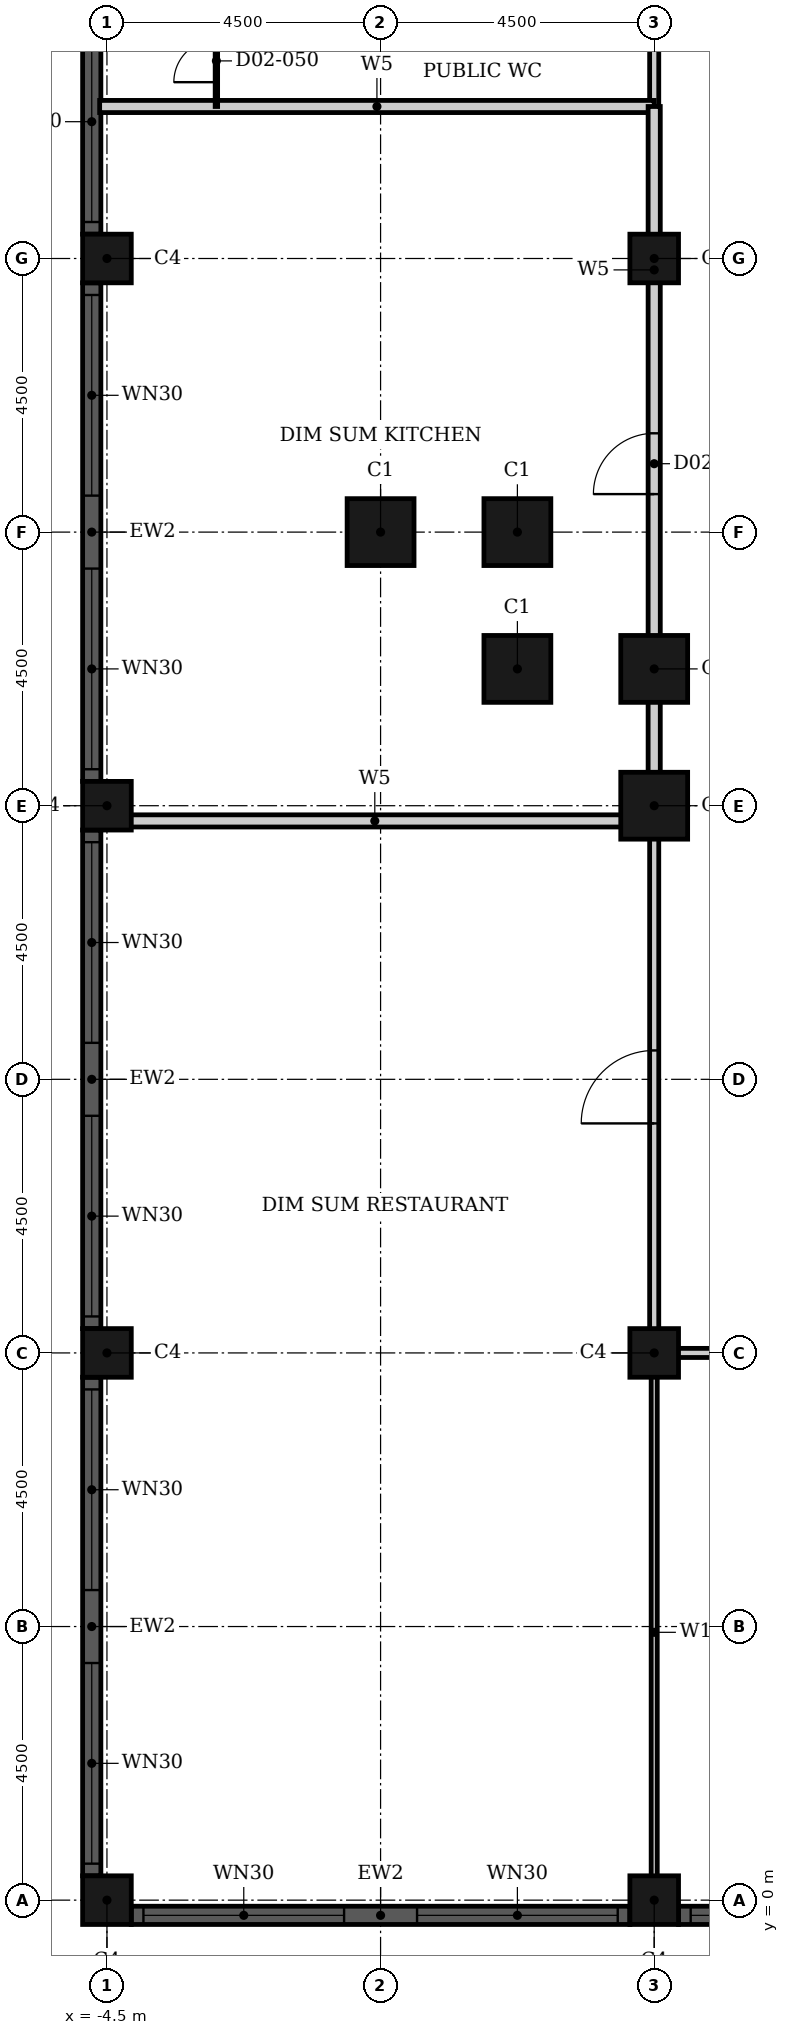
"""IFC4 building model, lengths in metres.
Left out: names, types, materials, properties, quantities, classifications, styles, units other than length and angle.
Written with IfcOpenShell. Run it as: python <this file> out.ifc"""

import sys

from ifc_helpers import new_model, si_unit, direction, frame, frame_2d, origin, origin_2d, place, context, subcontext, project, spatial, rectangle, hollow_rectangle, extrude, element, fill, save


model = new_model("IFC4")
c1 = context("Model", 3, precision=1e-05, world=origin(), true_north=direction((0.0, 1.0)))
c2 = subcontext(c1, "Body", "Model", "MODEL_VIEW")
j1 = project(units=[si_unit("LENGTHUNIT", "METRE"), si_unit("PLANEANGLEUNIT", "RADIAN")], contexts=[c1])
p1 = place(None, origin())
s1 = spatial("IfcSite", under=j1, at=p1, CompositionType="ELEMENT")
p2 = place(p1, origin())
s2 = spatial("IfcBuilding", under=s1, at=p2, CompositionType="ELEMENT")
p3 = place(p2, frame((0.0, 0.0, 12.0)))
s3 = spatial("IfcBuildingStorey", under=s2, at=p3, CompositionType="ELEMENT", Elevation=12.0)
for number, where, z_axis, x_axis in (
    (1, (0.0, 22.5, 0.0), (0.0, 0.0, 1.0), (1.0, 0.0, 0.0)),
    (2, (2.25, 22.5, 0.0), (0.0, 0.0, 1.0), (1.0, 0.0, 0.0)),
    (3, (2.25, 20.25, 0.0), (0.0, 0.0, 1.0), (1.0, 0.0, 0.0)),
    (4, (4.5, 20.25, 0.0), (0.0, 0.0, 1.0), (1.0, 0.0, 0.0)),
    (5, (4.5, 18.0, 0.0), (0.0, 0.0, 1.0), (1.0, 0.0, 0.0)),
):
    element("IfcColumn", number, at=place(p3, frame(where, z_axis=z_axis, x_axis=x_axis)), inside=s3, PredefinedType="COLUMN", context=c2, shape_type="SweptSolid", body=[
        extrude(hollow_rectangle(XDim=1.1, YDim=1.1, WallThickness=0.036, at=origin_2d()), origin(), (0.0, 0.0, 1.0), 5.4),
    ])
for number, where, z_axis, x_axis in (
    (6, (-4.5, 0.0, 0.0), (0.0, 0.0, 1.0), (1.0, 0.0, 0.0)),
    (7, (-4.5, 9.0, 0.0), (0.0, 0.0, 1.0), (1.0, 0.0, 0.0)),
    (8, (-4.5, 18.0, 0.0), (0.0, 0.0, 1.0), (1.0, 0.0, 0.0)),
    (9, (-4.5, 27.0, 0.0), (0.0, 0.0, 1.0), (1.0, 0.0, 0.0)),
    (10, (4.5, 0.0, 0.0), (0.0, 0.0, 1.0), (1.0, 0.0, 0.0)),
    (11, (4.5, 9.0, 0.0), (0.0, 0.0, 1.0), (1.0, 0.0, 0.0)),
    (12, (4.5, 27.0, 0.0), (0.0, 0.0, 1.0), (1.0, 0.0, 0.0)),
):
    element("IfcColumn", number, at=place(p3, frame(where, z_axis=z_axis, x_axis=x_axis)), inside=s3, PredefinedType="COLUMN", context=c2, shape_type="SweptSolid", body=[
        extrude(hollow_rectangle(XDim=0.8, YDim=0.8, WallThickness=0.025, at=origin_2d()), origin(), (0.0, 0.0, 1.0), 5.4),
    ])
p4 = place(p3, frame((-4.75, 35.6, 0.0), z_axis=(0.0, 0.0, 1.0), x_axis=(0.0, -1.0, 0.0)))
e13 = element("IfcWall", 13, at=p4, inside=s3, PredefinedType="SOLIDWALL", context=c2, shape_type="SweptSolid", body=[
    extrude(rectangle(XDim=8.2, YDim=0.3, at=frame_2d((4.1, 0.0))), origin(), (0.0, 0.0, 1.0), 5.4),
])
p5 = place(p4, frame((0.2, 0.0, 0.9)))
e14 = element("IfcOpeningElement", 14, at=p5, cuts=e13, PredefinedType="OPENING", context=c2, shape_type="SweptSolid", body=[
    extrude(rectangle(XDim=3.3, YDim=3.5, at=frame_2d((1.65, 1.75))), frame((0.0, 0.16, 0.0), z_axis=(0.0, -1.0, 0.0), x_axis=(1.0, 0.0, 0.0)), (0.0, 0.0, 1.0), 0.32),
])
p6 = place(p4, frame((4.7, 0.0, 0.9)))
e15 = element("IfcOpeningElement", 15, at=p6, cuts=e13, PredefinedType="OPENING", context=c2, shape_type="SweptSolid", body=[
    extrude(rectangle(XDim=3.3, YDim=3.5, at=frame_2d((1.65, 1.75))), frame((0.0, 0.16, 0.0), z_axis=(0.0, -1.0, 0.0), x_axis=(1.0, 0.0, 0.0)), (0.0, 0.0, 1.0), 0.32),
])
p7 = place(p3, frame((-4.75, 26.6, 0.0), z_axis=(0.0, 0.0, 1.0), x_axis=(0.0, -1.0, 0.0)))
e16 = element("IfcWall", 16, at=p7, inside=s3, PredefinedType="SOLIDWALL", context=c2, shape_type="SweptSolid", body=[
    extrude(rectangle(XDim=8.2, YDim=0.3, at=frame_2d((4.1, 0.0))), origin(), (0.0, 0.0, 1.0), 5.4),
])
p8 = place(p7, frame((0.2, 0.0, 0.9)))
e17 = element("IfcOpeningElement", 17, at=p8, cuts=e16, PredefinedType="OPENING", context=c2, shape_type="SweptSolid", body=[
    extrude(rectangle(XDim=3.3, YDim=3.5, at=frame_2d((1.65, 1.75))), frame((0.0, 0.16, 0.0), z_axis=(0.0, -1.0, 0.0), x_axis=(1.0, 0.0, 0.0)), (0.0, 0.0, 1.0), 0.32),
])
p9 = place(p7, frame((4.7, 0.0, 0.9)))
e18 = element("IfcOpeningElement", 18, at=p9, cuts=e16, PredefinedType="OPENING", context=c2, shape_type="SweptSolid", body=[
    extrude(rectangle(XDim=3.3, YDim=3.5, at=frame_2d((1.65, 1.75))), frame((0.0, 0.16, 0.0), z_axis=(0.0, -1.0, 0.0), x_axis=(1.0, 0.0, 0.0)), (0.0, 0.0, 1.0), 0.32),
])
p10 = place(p3, frame((-4.75, 17.6, 0.0), z_axis=(0.0, 0.0, 1.0), x_axis=(0.0, -1.0, 0.0)))
e19 = element("IfcWall", 19, at=p10, inside=s3, PredefinedType="SOLIDWALL", context=c2, shape_type="SweptSolid", body=[
    extrude(rectangle(XDim=8.2, YDim=0.3, at=frame_2d((4.1, 0.0))), origin(), (0.0, 0.0, 1.0), 5.4),
])
p11 = place(p10, frame((0.2, 0.0, 0.9)))
e20 = element("IfcOpeningElement", 20, at=p11, cuts=e19, PredefinedType="OPENING", context=c2, shape_type="SweptSolid", body=[
    extrude(rectangle(XDim=3.3, YDim=3.5, at=frame_2d((1.65, 1.75))), frame((0.0, 0.16, 0.0), z_axis=(0.0, -1.0, 0.0), x_axis=(1.0, 0.0, 0.0)), (0.0, 0.0, 1.0), 0.32),
])
p12 = place(p10, frame((4.7, 0.0, 0.9)))
e21 = element("IfcOpeningElement", 21, at=p12, cuts=e19, PredefinedType="OPENING", context=c2, shape_type="SweptSolid", body=[
    extrude(rectangle(XDim=3.3, YDim=3.5, at=frame_2d((1.65, 1.75))), frame((0.0, 0.16, 0.0), z_axis=(0.0, -1.0, 0.0), x_axis=(1.0, 0.0, 0.0)), (0.0, 0.0, 1.0), 0.32),
])
p13 = place(p3, frame((-4.75, 8.6, 0.0), z_axis=(0.0, 0.0, 1.0), x_axis=(0.0, -1.0, 0.0)))
e22 = element("IfcWall", 22, at=p13, inside=s3, PredefinedType="SOLIDWALL", context=c2, shape_type="SweptSolid", body=[
    extrude(rectangle(XDim=8.2, YDim=0.3, at=frame_2d((4.1, 0.0))), origin(), (0.0, 0.0, 1.0), 5.4),
])
p14 = place(p13, frame((0.2, 0.0, 0.9)))
e23 = element("IfcOpeningElement", 23, at=p14, cuts=e22, PredefinedType="OPENING", context=c2, shape_type="SweptSolid", body=[
    extrude(rectangle(XDim=3.3, YDim=3.5, at=frame_2d((1.65, 1.75))), frame((0.0, 0.16, 0.0), z_axis=(0.0, -1.0, 0.0), x_axis=(1.0, 0.0, 0.0)), (0.0, 0.0, 1.0), 0.32),
])
p15 = place(p13, frame((4.7, 0.0, 0.9)))
e24 = element("IfcOpeningElement", 24, at=p15, cuts=e22, PredefinedType="OPENING", context=c2, shape_type="SweptSolid", body=[
    extrude(rectangle(XDim=3.3, YDim=3.5, at=frame_2d((1.65, 1.75))), frame((0.0, 0.16, 0.0), z_axis=(0.0, -1.0, 0.0), x_axis=(1.0, 0.0, 0.0)), (0.0, 0.0, 1.0), 0.32),
])
p16 = place(p3, frame((-4.1, -0.25, 0.0), z_axis=(0.0, 0.0, 1.0), x_axis=(1.0, 0.0, 0.0)))
e25 = element("IfcWall", 25, at=p16, inside=s3, PredefinedType="SOLIDWALL", context=c2, shape_type="SweptSolid", body=[
    extrude(rectangle(XDim=8.2, YDim=0.3, at=frame_2d((4.1, 0.0))), origin(), (0.0, 0.0, 1.0), 5.4),
])
p17 = place(p16, frame((0.2, 0.0, 0.9)))
e26 = element("IfcOpeningElement", 26, at=p17, cuts=e25, PredefinedType="OPENING", context=c2, shape_type="SweptSolid", body=[
    extrude(rectangle(XDim=3.3, YDim=3.5, at=frame_2d((1.65, 1.75))), frame((0.0, 0.16, 0.0), z_axis=(0.0, -1.0, 0.0), x_axis=(1.0, 0.0, 0.0)), (0.0, 0.0, 1.0), 0.32),
])
p18 = place(p16, frame((4.7, 0.0, 0.9)))
e27 = element("IfcOpeningElement", 27, at=p18, cuts=e25, PredefinedType="OPENING", context=c2, shape_type="SweptSolid", body=[
    extrude(rectangle(XDim=3.3, YDim=3.5, at=frame_2d((1.65, 1.75))), frame((0.0, 0.16, 0.0), z_axis=(0.0, -1.0, 0.0), x_axis=(1.0, 0.0, 0.0)), (0.0, 0.0, 1.0), 0.32),
])
p19 = place(p3, frame((4.9, -0.25, 0.0), z_axis=(0.0, 0.0, 1.0), x_axis=(1.0, 0.0, 0.0)))
e28 = element("IfcWall", 28, at=p19, inside=s3, PredefinedType="SOLIDWALL", context=c2, shape_type="SweptSolid", body=[
    extrude(rectangle(XDim=8.2, YDim=0.3, at=frame_2d((4.1, 0.0))), origin(), (0.0, 0.0, 1.0), 5.4),
])
p20 = place(p19, frame((0.2, 0.0, 0.9)))
e29 = element("IfcOpeningElement", 29, at=p20, cuts=e28, PredefinedType="OPENING", context=c2, shape_type="SweptSolid", body=[
    extrude(rectangle(XDim=3.3, YDim=3.5, at=frame_2d((1.65, 1.75))), frame((0.0, 0.16, 0.0), z_axis=(0.0, -1.0, 0.0), x_axis=(1.0, 0.0, 0.0)), (0.0, 0.0, 1.0), 0.32),
])
p21 = place(p19, frame((4.7, 0.0, 0.9)))
e30 = element("IfcOpeningElement", 30, at=p21, cuts=e28, PredefinedType="OPENING", context=c2, shape_type="SweptSolid", body=[
    extrude(rectangle(XDim=3.3, YDim=3.5, at=frame_2d((1.65, 1.75))), frame((0.0, 0.16, 0.0), z_axis=(0.0, -1.0, 0.0), x_axis=(1.0, 0.0, 0.0)), (0.0, 0.0, 1.0), 0.32),
])
p22 = place(p3, frame((4.5, 9.0, 0.0), z_axis=(0.0, 0.0, 1.0), x_axis=(1.0, 0.0, 0.0)))
e31 = element("IfcWall", 31, at=p22, inside=s3, PredefinedType="PARTITIONING", context=c2, shape_type="SweptSolid", body=[
    extrude(rectangle(XDim=3.1, YDim=0.15, at=frame_2d((1.55, 0.0))), origin(), (0.0, 0.0, 1.0), 5.05),
])
p23 = place(p3, frame((4.5, 9.0, 0.0), z_axis=(0.0, 0.0, 1.0), x_axis=(0.0, 1.0, 0.0)))
e32 = element("IfcWall", 32, at=p23, inside=s3, PredefinedType="PARTITIONING", context=c2, shape_type="SweptSolid", body=[
    extrude(rectangle(XDim=8.75, YDim=0.15, at=frame_2d((4.375, 0.0))), origin(), (0.0, 0.0, 1.0), 5.05),
])
p24 = place(p23, frame((3.775, 0.0, 0.0)))
e33 = element("IfcOpeningElement", 33, at=p24, cuts=e32, PredefinedType="OPENING", context=c2, shape_type="SweptSolid", body=[
    extrude(rectangle(XDim=1.2, YDim=2.4, at=frame_2d((0.6, 1.2))), frame((0.0, 0.085, 0.0), z_axis=(0.0, -1.0, 0.0), x_axis=(1.0, 0.0, 0.0)), (0.0, 0.0, 1.0), 0.17),
])
p25 = place(p3, frame((4.5, 29.5, 0.0), z_axis=(0.0, 0.0, 1.0), x_axis=(0.0, 1.0, 0.0)))
e34 = element("IfcWall", 34, at=p25, inside=s3, PredefinedType="PARTITIONING", context=c2, shape_type="SweptSolid", body=[
    extrude(rectangle(XDim=4.5, YDim=0.15, at=frame_2d((2.25, 0.0))), origin(), (0.0, 0.0, 1.0), 5.05),
])
p26 = place(p3, frame((4.5, -0.19, 0.0), z_axis=(0.0, 0.0, 1.0), x_axis=(0.0, 1.0, 0.0)))
e35 = element("IfcWall", 35, at=p26, inside=s3, PredefinedType="PARTITIONING", context=c2, shape_type="SweptSolid", body=[
    extrude(rectangle(XDim=9.19, YDim=0.1, at=frame_2d((4.595, 0.0))), origin(), (0.0, 0.0, 1.0), 5.05),
])
p27 = place(p3, frame((-4.69, 17.75, 0.0), z_axis=(0.0, 0.0, 1.0), x_axis=(1.0, 0.0, 0.0)))
e36 = element("IfcWall", 36, at=p27, inside=s3, PredefinedType="PARTITIONING", context=c2, shape_type="SweptSolid", body=[
    extrude(rectangle(XDim=9.19, YDim=0.2, at=frame_2d((4.595, 0.0))), origin(), (0.0, 0.0, 1.0), 5.05),
])
p28 = place(p3, frame((-4.62, 29.5, 0.0), z_axis=(0.0, 0.0, 1.0), x_axis=(1.0, 0.0, 0.0)))
e37 = element("IfcWall", 37, at=p28, inside=s3, PredefinedType="PARTITIONING", context=c2, shape_type="SweptSolid", body=[
    extrude(rectangle(XDim=9.12, YDim=0.2, at=frame_2d((4.56, 0.0))), origin(), (0.0, 0.0, 1.0), 5.05),
])
p29 = place(p3, frame((4.5, 17.75, 0.0), z_axis=(0.0, 0.0, 1.0), x_axis=(0.0, 1.0, 0.0)))
e38 = element("IfcWall", 38, at=p29, inside=s3, PredefinedType="PARTITIONING", context=c2, shape_type="SweptSolid", body=[
    extrude(rectangle(XDim=11.75, YDim=0.2, at=frame_2d((5.875, 0.0))), origin(), (0.0, 0.0, 1.0), 5.05),
])
p30 = place(p29, frame((5.375, 0.0, 0.0)))
e39 = element("IfcOpeningElement", 39, at=p30, cuts=e38, PredefinedType="OPENING", context=c2, shape_type="SweptSolid", body=[
    extrude(rectangle(XDim=1.0, YDim=2.1, at=frame_2d((0.5, 1.05))), frame((0.0, 0.11, 0.0), z_axis=(0.0, -1.0, 0.0), x_axis=(1.0, 0.0, 0.0)), (0.0, 0.0, 1.0), 0.22),
])
p31 = place(p3, frame((-2.7, 29.5, 0.0), z_axis=(0.0, 0.0, 1.0), x_axis=(0.0, 1.0, 0.0)))
e40 = element("IfcWall", 40, at=p31, inside=s3, PredefinedType="PARTITIONING", context=c2, shape_type="SweptSolid", body=[
    extrude(rectangle(XDim=4.5, YDim=0.04, at=frame_2d((2.25, 0.0))), origin(), (0.0, 0.0, 1.0), 5.05),
])
p32 = place(p31, frame((0.4, 0.0, 0.0)))
e41 = element("IfcOpeningElement", 41, at=p32, cuts=e40, PredefinedType="OPENING", context=c2, shape_type="SweptSolid", body=[
    extrude(rectangle(XDim=0.7, YDim=2.0, at=frame_2d((0.35, 1.0))), frame((0.0, 0.03, 0.0), z_axis=(0.0, -1.0, 0.0), x_axis=(1.0, 0.0, 0.0)), (0.0, 0.0, 1.0), 0.06),
])
p33 = place(p31, frame((1.9, 0.0, 0.0)))
e42 = element("IfcOpeningElement", 42, at=p33, cuts=e40, PredefinedType="OPENING", context=c2, shape_type="SweptSolid", body=[
    extrude(rectangle(XDim=0.7, YDim=2.0, at=frame_2d((0.35, 1.0))), frame((0.0, 0.03, 0.0), z_axis=(0.0, -1.0, 0.0), x_axis=(1.0, 0.0, 0.0)), (0.0, 0.0, 1.0), 0.06),
])
p34 = place(p31, frame((3.3, 0.0, 0.0)))
e43 = element("IfcOpeningElement", 43, at=p34, cuts=e40, PredefinedType="OPENING", context=c2, shape_type="SweptSolid", body=[
    extrude(rectangle(XDim=0.9, YDim=2.0, at=frame_2d((0.45, 1.0))), frame((0.0, 0.03, 0.0), z_axis=(0.0, -1.0, 0.0), x_axis=(1.0, 0.0, 0.0)), (0.0, 0.0, 1.0), 0.06),
])
p35 = place(p6, origin())
e44 = element("IfcWindow", 44, at=p35, inside=s3, PartitioningType="SINGLE_PANEL", PredefinedType="WINDOW", context=c2, shape_type="SweptSolid", body=[
    extrude(rectangle(XDim=3.3, YDim=3.5, at=frame_2d((1.65, 1.75))), frame((0.0, 0.03, 0.0), z_axis=(0.0, -1.0, 0.0), x_axis=(1.0, 0.0, 0.0)), (0.0, 0.0, 1.0), 0.06),
])
fill(e15, e44)
p36 = place(p8, origin())
e45 = element("IfcWindow", 45, at=p36, inside=s3, PartitioningType="SINGLE_PANEL", PredefinedType="WINDOW", context=c2, shape_type="SweptSolid", body=[
    extrude(rectangle(XDim=3.3, YDim=3.5, at=frame_2d((1.65, 1.75))), frame((0.0, 0.03, 0.0), z_axis=(0.0, -1.0, 0.0), x_axis=(1.0, 0.0, 0.0)), (0.0, 0.0, 1.0), 0.06),
])
fill(e17, e45)
p37 = place(p9, origin())
e46 = element("IfcWindow", 46, at=p37, inside=s3, PartitioningType="SINGLE_PANEL", PredefinedType="WINDOW", context=c2, shape_type="SweptSolid", body=[
    extrude(rectangle(XDim=3.3, YDim=3.5, at=frame_2d((1.65, 1.75))), frame((0.0, 0.03, 0.0), z_axis=(0.0, -1.0, 0.0), x_axis=(1.0, 0.0, 0.0)), (0.0, 0.0, 1.0), 0.06),
])
fill(e18, e46)
p38 = place(p11, origin())
e47 = element("IfcWindow", 47, at=p38, inside=s3, PartitioningType="SINGLE_PANEL", PredefinedType="WINDOW", context=c2, shape_type="SweptSolid", body=[
    extrude(rectangle(XDim=3.3, YDim=3.5, at=frame_2d((1.65, 1.75))), frame((0.0, 0.03, 0.0), z_axis=(0.0, -1.0, 0.0), x_axis=(1.0, 0.0, 0.0)), (0.0, 0.0, 1.0), 0.06),
])
fill(e20, e47)
p39 = place(p12, origin())
e48 = element("IfcWindow", 48, at=p39, inside=s3, PartitioningType="SINGLE_PANEL", PredefinedType="WINDOW", context=c2, shape_type="SweptSolid", body=[
    extrude(rectangle(XDim=3.3, YDim=3.5, at=frame_2d((1.65, 1.75))), frame((0.0, 0.03, 0.0), z_axis=(0.0, -1.0, 0.0), x_axis=(1.0, 0.0, 0.0)), (0.0, 0.0, 1.0), 0.06),
])
fill(e21, e48)
p40 = place(p14, origin())
e49 = element("IfcWindow", 49, at=p40, inside=s3, PartitioningType="SINGLE_PANEL", PredefinedType="WINDOW", context=c2, shape_type="SweptSolid", body=[
    extrude(rectangle(XDim=3.3, YDim=3.5, at=frame_2d((1.65, 1.75))), frame((0.0, 0.03, 0.0), z_axis=(0.0, -1.0, 0.0), x_axis=(1.0, 0.0, 0.0)), (0.0, 0.0, 1.0), 0.06),
])
fill(e23, e49)
p41 = place(p15, origin())
e50 = element("IfcWindow", 50, at=p41, inside=s3, PartitioningType="SINGLE_PANEL", PredefinedType="WINDOW", context=c2, shape_type="SweptSolid", body=[
    extrude(rectangle(XDim=3.3, YDim=3.5, at=frame_2d((1.65, 1.75))), frame((0.0, 0.03, 0.0), z_axis=(0.0, -1.0, 0.0), x_axis=(1.0, 0.0, 0.0)), (0.0, 0.0, 1.0), 0.06),
])
fill(e24, e50)
p42 = place(p17, origin())
e51 = element("IfcWindow", 51, at=p42, inside=s3, PartitioningType="SINGLE_PANEL", PredefinedType="WINDOW", context=c2, shape_type="SweptSolid", body=[
    extrude(rectangle(XDim=3.3, YDim=3.5, at=frame_2d((1.65, 1.75))), frame((0.0, 0.03, 0.0), z_axis=(0.0, -1.0, 0.0), x_axis=(1.0, 0.0, 0.0)), (0.0, 0.0, 1.0), 0.06),
])
fill(e26, e51)
p43 = place(p18, origin())
e52 = element("IfcWindow", 52, at=p43, inside=s3, PartitioningType="SINGLE_PANEL", PredefinedType="WINDOW", context=c2, shape_type="SweptSolid", body=[
    extrude(rectangle(XDim=3.3, YDim=3.5, at=frame_2d((1.65, 1.75))), frame((0.0, 0.03, 0.0), z_axis=(0.0, -1.0, 0.0), x_axis=(1.0, 0.0, 0.0)), (0.0, 0.0, 1.0), 0.06),
])
fill(e27, e52)
p44 = place(p20, origin())
e53 = element("IfcWindow", 53, at=p44, inside=s3, PartitioningType="SINGLE_PANEL", PredefinedType="WINDOW", context=c2, shape_type="SweptSolid", body=[
    extrude(rectangle(XDim=3.3, YDim=3.5, at=frame_2d((1.65, 1.75))), frame((0.0, 0.03, 0.0), z_axis=(0.0, -1.0, 0.0), x_axis=(1.0, 0.0, 0.0)), (0.0, 0.0, 1.0), 0.06),
])
fill(e29, e53)
p45 = place(p24, origin())
e54 = element("IfcDoor", 54, at=p45, inside=s3, OperationType="SINGLE_SWING_LEFT", PredefinedType="DOOR", context=c2, shape_type="SweptSolid", body=[
    extrude(rectangle(XDim=1.2, YDim=2.4, at=frame_2d((0.6, 1.2))), frame((0.0, 0.025, 0.0), z_axis=(0.0, -1.0, 0.0), x_axis=(1.0, 0.0, 0.0)), (0.0, 0.0, 1.0), 0.05),
])
fill(e33, e54)
p46 = place(p30, origin())
e55 = element("IfcDoor", 55, at=p46, inside=s3, OperationType="SINGLE_SWING_RIGHT", PredefinedType="DOOR", context=c2, shape_type="SweptSolid", body=[
    extrude(rectangle(XDim=1.0, YDim=2.1, at=frame_2d((0.5, 1.05))), frame((0.0, 0.025, 0.0), z_axis=(0.0, -1.0, 0.0), x_axis=(1.0, 0.0, 0.0)), (0.0, 0.0, 1.0), 0.05),
])
fill(e39, e55)
p47 = place(p32, origin())
e56 = element("IfcDoor", 56, at=p47, inside=s3, OperationType="SINGLE_SWING_LEFT", PredefinedType="DOOR", context=c2, shape_type="SweptSolid", body=[
    extrude(rectangle(XDim=0.7, YDim=2.0, at=frame_2d((0.35, 1.0))), frame((0.0, 0.02, 0.0), z_axis=(0.0, -1.0, 0.0), x_axis=(1.0, 0.0, 0.0)), (0.0, 0.0, 1.0), 0.04),
])
fill(e41, e56)
save(model, sys.argv[1])
